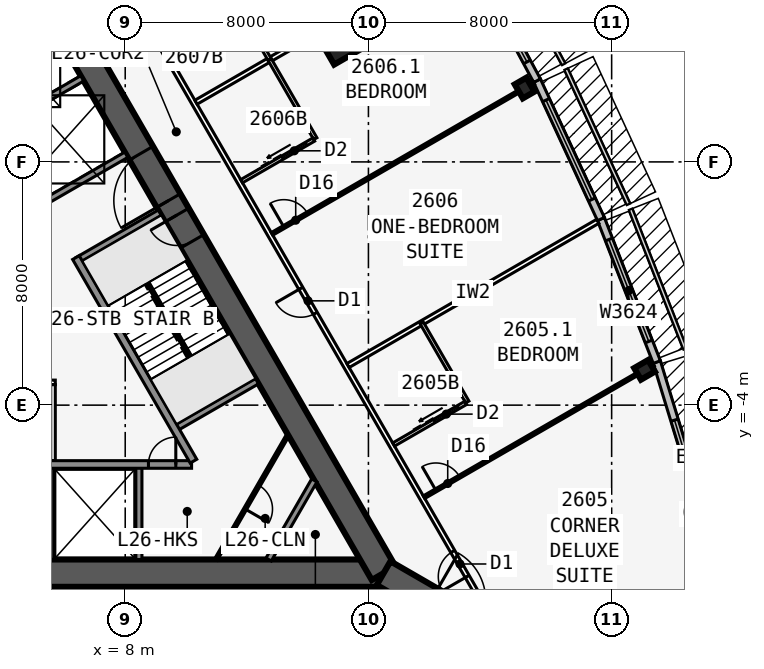
"""IFC4 building model, lengths in metres.
Left out: names, types, materials, properties, quantities, classifications, styles, units other than length and angle.
Written with IfcOpenShell. Run it as: python <this file> out.ifc"""

import sys

from ifc_helpers import new_model, si_unit, direction, frame, frame_2d, origin, origin_2d, place, context, subcontext, project, spatial, rectangle, i_section, extrude, element, fill, save


model = new_model("IFC4")
c1 = context("Model", 3, precision=1e-05, world=origin(), true_north=direction((0.0, 1.0)))
c2 = subcontext(c1, "Body", "Model", "MODEL_VIEW")
j1 = project(units=[si_unit("LENGTHUNIT", "METRE"), si_unit("PLANEANGLEUNIT", "RADIAN")], contexts=[c1])
p1 = place(None, origin())
s1 = spatial("IfcSite", under=j1, at=p1, CompositionType="ELEMENT")
p2 = place(p1, origin())
s2 = spatial("IfcBuilding", under=s1, at=p2, CompositionType="ELEMENT")
p3 = place(p2, frame((0.0, 0.0, 99.9)))
s3 = spatial("IfcBuildingStorey", under=s2, at=p3, CompositionType="ELEMENT", Elevation=99.9)
p4 = place(p3, frame((-16.5, -9.526, 0.0), z_axis=(0.0, 0.0, 1.0), x_axis=(1.0, 0.0, 0.0)))
e1 = element("IfcWall", 1, at=p4, inside=s3, PredefinedType="SHEAR", context=c2, shape_type="SweptSolid", body=[
    extrude(rectangle(XDim=33.0, YDim=0.9, at=frame_2d((16.5, 0.0))), origin(), (0.0, 0.0, 1.0), 3.4),
])
p5 = place(p4, frame((14.05, 0.0, 0.0)))
e2 = element("IfcOpeningElement", 2, at=p5, cuts=e1, PredefinedType="OPENING", context=c2, shape_type="SweptSolid", body=[
    extrude(rectangle(XDim=1.8, YDim=2.13, at=frame_2d((0.9, 1.065))), frame((0.0, 0.46, 0.0), z_axis=(0.0, -1.0, 0.0), x_axis=(1.0, 0.0, 0.0)), (0.0, 0.0, 1.0), 0.92),
])
p6 = place(p3, frame((-0.55, -5.951, 0.0), z_axis=(0.0, 0.0, 1.0), x_axis=(1.0, 0.0, 0.0)))
e3 = element("IfcWall", 3, at=p6, inside=s3, PredefinedType="SOLIDWALL", context=c2, shape_type="SweptSolid", body=[
    extrude(rectangle(XDim=10.733, YDim=0.25, at=frame_2d((5.366, 0.0))), origin(), (0.0, 0.0, 1.0), 3.15),
])
p7 = place(p6, frame((9.314, 0.0, 0.0)))
e4 = element("IfcOpeningElement", 4, at=p7, cuts=e3, PredefinedType="OPENING", context=c2, shape_type="SweptSolid", body=[
    extrude(rectangle(XDim=0.9, YDim=2.13, at=frame_2d((0.45, 1.065))), frame((0.0, 0.135, 0.0), z_axis=(0.0, -1.0, 0.0), x_axis=(1.0, 0.0, 0.0)), (0.0, 0.0, 1.0), 0.27),
])
p8 = place(p6, frame((1.05, 0.0, 0.0)))
e5 = element("IfcOpeningElement", 5, at=p8, cuts=e3, PredefinedType="OPENING", context=c2, shape_type="SweptSolid", body=[
    extrude(rectangle(XDim=1.1, YDim=2.13, at=frame_2d((0.55, 1.065))), frame((0.0, 0.135, 0.0), z_axis=(0.0, -1.0, 0.0), x_axis=(1.0, 0.0, 0.0)), (0.0, 0.0, 1.0), 0.27),
])
p9 = place(p6, frame((4.05, 0.0, 0.0)))
e6 = element("IfcOpeningElement", 6, at=p9, cuts=e3, PredefinedType="OPENING", context=c2, shape_type="SweptSolid", body=[
    extrude(rectangle(XDim=1.1, YDim=2.13, at=frame_2d((0.55, 1.065))), frame((0.0, 0.135, 0.0), z_axis=(0.0, -1.0, 0.0), x_axis=(1.0, 0.0, 0.0)), (0.0, 0.0, 1.0), 0.27),
])
for number, where, z_axis, x_axis in (
    (7, (5.55, -5.951, 0.0), (0.0, 0.0, 1.0), (0.0, -1.0, 0.0)),
    (8, (8.45, -5.951, 0.0), (0.0, 0.0, 1.0), (0.0, -1.0, 0.0)),
):
    element("IfcWall", number, at=place(p3, frame(where, z_axis=z_axis, x_axis=x_axis)), inside=s3, PredefinedType="SOLIDWALL", context=c2, shape_type="SweptSolid", body=[
        extrude(rectangle(XDim=3.125, YDim=0.2, at=frame_2d((1.562, 0.0))), origin(), (0.0, 0.0, 1.0), 3.15),
    ])
p10 = place(p3, frame((16.5, -9.526, 0.0), z_axis=(0.0, 0.0, 1.0), x_axis=(-0.499999749417, 0.866025548458, 0.0)))
e9 = element("IfcWall", 9, at=p10, inside=s3, PredefinedType="SHEAR", context=c2, shape_type="SweptSolid", body=[
    extrude(rectangle(XDim=33.0, YDim=0.9, at=frame_2d((16.5, 0.0))), origin(), (0.0, 0.0, 1.0), 3.4),
])
p11 = place(p10, frame((14.15, 0.0, 0.0)))
e10 = element("IfcOpeningElement", 10, at=p11, cuts=e9, PredefinedType="OPENING", context=c2, shape_type="SweptSolid", body=[
    extrude(rectangle(XDim=1.8, YDim=2.13, at=frame_2d((0.9, 1.065))), frame((0.0, 0.46, 0.0), z_axis=(0.0, -1.0, 0.0), x_axis=(1.0, 0.0, 0.0)), (0.0, 0.0, 1.0), 0.92),
])
p12 = place(p10, frame((12.6, 0.0, 0.0)))
e11 = element("IfcOpeningElement", 11, at=p12, cuts=e9, PredefinedType="OPENING", context=c2, shape_type="SweptSolid", body=[
    extrude(rectangle(XDim=1.0, YDim=2.13, at=frame_2d((0.5, 1.065))), frame((0.0, 0.46, 0.0), z_axis=(0.0, -1.0, 0.0), x_axis=(1.0, 0.0, 0.0)), (0.0, 0.0, 1.0), 0.92),
])
p13 = place(p3, frame((10.245, -5.843, 0.0), z_axis=(0.0, 0.0, 1.0), x_axis=(-0.499993009313, 0.866029439822, 0.0)))
e12 = element("IfcWall", 12, at=p13, inside=s3, PredefinedType="SOLIDWALL", context=c2, shape_type="SweptSolid", body=[
    extrude(rectangle(XDim=7.733, YDim=0.25, at=frame_2d((3.866, 0.0))), origin(), (0.0, 0.0, 1.0), 3.15),
])
for number, where, z_axis, x_axis in (
    (13, (9.629, -4.775, 0.0), (0.0, 0.0, 1.0), (0.866, 0.5, 0.0)),
    (14, (6.429, 0.767, 0.0), (0.0, 0.0, 1.0), (0.866, 0.5, 0.0)),
    (15, (5.329, 2.673, 0.0), (0.0, 0.0, 1.0), (0.866, 0.5, 0.0)),
    (16, (3.879, 5.184, 0.0), (0.0, 0.0, 1.0), (0.866, 0.5, 0.0)),
):
    element("IfcWall", number, at=place(p3, frame(where, z_axis=z_axis, x_axis=x_axis)), inside=s3, PredefinedType="SOLIDWALL", context=c2, shape_type="SweptSolid", body=[
        extrude(rectangle(XDim=3.125, YDim=0.2, at=frame_2d((1.562, 0.0))), origin(), (0.0, 0.0, 1.0), 3.15),
    ])
p14 = place(p3, frame((16.5, -9.526, 0.0), z_axis=(0.0, 0.0, 1.0), x_axis=(0.866031398331, -0.499989616998, 0.0)))
e17 = element("IfcWall", 17, at=p14, inside=s3, PredefinedType="SHEAR", context=c2, shape_type="SweptSolid", body=[
    extrude(rectangle(XDim=4.746, YDim=0.9, at=frame_2d((2.373, 0.0))), origin(), (0.0, 0.0, 1.0), 3.4),
])
p15 = place(p14, frame((1.8, 0.0, 0.0)))
e18 = element("IfcOpeningElement", 18, at=p15, cuts=e17, PredefinedType="OPENING", context=c2, shape_type="SweptSolid", body=[
    extrude(rectangle(XDim=1.8, YDim=2.13, at=frame_2d((0.9, 1.065))), frame((0.0, 0.46, 0.0), z_axis=(0.0, -1.0, 0.0), x_axis=(1.0, 0.0, 0.0)), (0.0, 0.0, 1.0), 0.92),
])
for number, where, z_axis, x_axis in (
    (19, (25.083, -2.839, 0.0), (0.0, 0.0, 1.0), (-0.5, 0.866, 0.0)),
    (20, (21.137, 6.43, 0.0), (0.0, 0.0, 1.0), (0.866, 0.5, 0.0)),
):
    element("IfcColumn", number, at=place(p3, frame(where, z_axis=z_axis, x_axis=x_axis)), inside=s3, PredefinedType="COLUMN", context=c2, shape_type="SweptSolid", body=[
        extrude(i_section(OverallWidth=0.442, OverallDepth=0.531, WebThickness=0.066, FlangeThickness=0.106, at=origin_2d()), origin(), (0.0, 0.0, 1.0), 3.4),
    ])
p16 = place(p3, frame((15.312, 8.84, 0.0), z_axis=(0.0, 0.0, 1.0), x_axis=(0.866025403784, 0.5, 0.0)))
e21 = element("IfcColumn", 21, at=p16, inside=s3, PredefinedType="COLUMN", context=c2, shape_type="SweptSolid", body=[
    extrude(rectangle(XDim=2.4, YDim=2.4, at=origin_2d()), origin(), (0.0, 0.0, 1.0), 3.4),
])
p17 = place(p3, frame((27.88, -10.429, 0.0), z_axis=(0.0, 0.0, 1.0), x_axis=(-0.2919790669, 0.956424709265, 0.0)))
e22 = element("IfcWall", 22, at=p17, inside=s3, PredefinedType="STANDARD", context=c2, shape_type="SweptSolid", body=[
    extrude(rectangle(XDim=8.211, YDim=0.25, at=frame_2d((4.105, 0.0))), origin(), (0.0, 0.0, 1.0), 3.15),
])
p18 = place(p17, frame((2.006, 0.0, 0.45)))
e23 = element("IfcOpeningElement", 23, at=p18, cuts=e22, PredefinedType="OPENING", context=c2, shape_type="SweptSolid", body=[
    extrude(rectangle(XDim=4.2, YDim=2.4, at=frame_2d((2.1, 1.2))), frame((0.0, 0.135, 0.0), z_axis=(0.0, -1.0, 0.0), x_axis=(1.0, 0.0, 0.0)), (0.0, 0.0, 1.0), 0.27),
])
p19 = place(p3, frame((25.486, -2.584, 0.0), z_axis=(0.0, 0.0, 1.0), x_axis=(-0.364013463868, 0.931393685894, 0.0)))
e24 = element("IfcWall", 24, at=p19, inside=s3, PredefinedType="STANDARD", context=c2, shape_type="SweptSolid", body=[
    extrude(rectangle(XDim=5.058, YDim=0.25, at=frame_2d((2.529, 0.0))), origin(), (0.0, 0.0, 1.0), 3.15),
])
p20 = place(p19, frame((0.729, 0.0, 0.45)))
e25 = element("IfcOpeningElement", 25, at=p20, cuts=e24, PredefinedType="OPENING", context=c2, shape_type="SweptSolid", body=[
    extrude(rectangle(XDim=3.6, YDim=2.4, at=frame_2d((1.8, 1.2))), frame((0.0, 0.135, 0.0), z_axis=(0.0, -1.0, 0.0), x_axis=(1.0, 0.0, 0.0)), (0.0, 0.0, 1.0), 0.27),
])
p21 = place(p3, frame((23.648, 2.119, 0.0), z_axis=(0.0, 0.0, 1.0), x_axis=(-0.419203100754, 0.907892482796, 0.0)))
e26 = element("IfcWall", 26, at=p21, inside=s3, PredefinedType="STANDARD", context=c2, shape_type="SweptSolid", body=[
    extrude(rectangle(XDim=5.021, YDim=0.25, at=frame_2d((2.51, 0.0))), origin(), (0.0, 0.0, 1.0), 3.15),
])
p22 = place(p21, frame((0.71, 0.0, 0.45)))
e27 = element("IfcOpeningElement", 27, at=p22, cuts=e26, PredefinedType="OPENING", context=c2, shape_type="SweptSolid", body=[
    extrude(rectangle(XDim=3.6, YDim=2.4, at=frame_2d((1.8, 1.2))), frame((0.0, 0.135, 0.0), z_axis=(0.0, -1.0, 0.0), x_axis=(1.0, 0.0, 0.0)), (0.0, 0.0, 1.0), 0.27),
])
p23 = place(p3, frame((21.547, 6.671, 0.0), z_axis=(0.0, 0.0, 1.0), x_axis=(-0.473412820489, 0.880840678782, 0.0)))
e28 = element("IfcWall", 28, at=p23, inside=s3, PredefinedType="STANDARD", context=c2, shape_type="SweptSolid", body=[
    extrude(rectangle(XDim=5.002, YDim=0.25, at=frame_2d((2.501, 0.0))), origin(), (0.0, 0.0, 1.0), 3.15),
])
p24 = place(p23, frame((0.701, 0.0, 0.45)))
e29 = element("IfcOpeningElement", 29, at=p24, cuts=e28, PredefinedType="OPENING", context=c2, shape_type="SweptSolid", body=[
    extrude(rectangle(XDim=3.6, YDim=2.4, at=frame_2d((1.8, 1.2))), frame((0.0, 0.135, 0.0), z_axis=(0.0, -1.0, 0.0), x_axis=(1.0, 0.0, 0.0)), (0.0, 0.0, 1.0), 0.27),
])
p25 = place(p3, frame((20.027, -10.985, 0.0), z_axis=(0.0, 0.0, 1.0), x_axis=(-0.500001677587, 0.866024435227, 0.0)))
e30 = element("IfcWall", 30, at=p25, inside=s3, PredefinedType="PARTITIONING", context=c2, shape_type="SweptSolid", body=[
    extrude(rectangle(XDim=39.054, YDim=0.15, at=frame_2d((19.527, 0.0))), origin(), (0.0, 0.0, 1.0), 3.15),
])
p26 = place(p25, frame((1.558, 0.0, 0.0)))
e31 = element("IfcOpeningElement", 31, at=p26, cuts=e30, PredefinedType="OPENING", context=c2, shape_type="SweptSolid", body=[
    extrude(rectangle(XDim=0.95, YDim=2.13, at=frame_2d((0.475, 1.065))), frame((0.0, 0.085, 0.0), z_axis=(0.0, -1.0, 0.0), x_axis=(1.0, 0.0, 0.0)), (0.0, 0.0, 1.0), 0.17),
])
p27 = place(p25, frame((11.552, 0.0, 0.0)))
e32 = element("IfcOpeningElement", 32, at=p27, cuts=e30, PredefinedType="OPENING", context=c2, shape_type="SweptSolid", body=[
    extrude(rectangle(XDim=0.95, YDim=2.13, at=frame_2d((0.475, 1.065))), frame((0.0, 0.085, 0.0), z_axis=(0.0, -1.0, 0.0), x_axis=(1.0, 0.0, 0.0)), (0.0, 0.0, 1.0), 0.17),
])
p28 = place(p25, frame((22.752, 0.0, 0.0)))
e33 = element("IfcOpeningElement", 33, at=p28, cuts=e30, PredefinedType="OPENING", context=c2, shape_type="SweptSolid", body=[
    extrude(rectangle(XDim=0.95, YDim=2.13, at=frame_2d((0.475, 1.065))), frame((0.0, 0.085, 0.0), z_axis=(0.0, -1.0, 0.0), x_axis=(1.0, 0.0, 0.0)), (0.0, 0.0, 1.0), 0.17),
])
p29 = place(p25, frame((36.546, 0.0, 0.0)))
e34 = element("IfcOpeningElement", 34, at=p29, cuts=e30, PredefinedType="OPENING", context=c2, shape_type="SweptSolid", body=[
    extrude(rectangle(XDim=0.95, YDim=2.13, at=frame_2d((0.475, 1.065))), frame((0.0, 0.085, 0.0), z_axis=(0.0, -1.0, 0.0), x_axis=(1.0, 0.0, 0.0)), (0.0, 0.0, 1.0), 0.17),
])
p30 = place(p3, frame((17.829, -7.027, 0.0), z_axis=(0.0, 0.0, 1.0), x_axis=(0.866032659912, 0.499987431809, 0.0)))
e35 = element("IfcWall", 35, at=p30, inside=s3, PredefinedType="PARTITIONING", context=c2, shape_type="SweptSolid", body=[
    extrude(rectangle(XDim=8.72, YDim=0.1, at=frame_2d((4.36, 0.0))), origin(), (0.0, 0.0, 1.0), 2.05),
])
p31 = place(p30, frame((0.45, 0.0, 0.0)))
e36 = element("IfcOpeningElement", 36, at=p31, cuts=e35, PredefinedType="OPENING", context=c2, shape_type="SweptSolid", body=[
    extrude(rectangle(XDim=0.9, YDim=2.032, at=frame_2d((0.45, 1.016))), frame((0.0, 0.06, 0.0), z_axis=(0.0, -1.0, 0.0), x_axis=(1.0, 0.0, 0.0)), (0.0, 0.0, 1.0), 0.12),
])
p32 = place(p3, frame((15.329, -2.697, 0.0), z_axis=(0.0, 0.0, 1.0), x_axis=(0.866018409083, 0.500012114982, 0.0)))
e37 = element("IfcWall", 37, at=p32, inside=s3, PredefinedType="PARTITIONING", context=c2, shape_type="SweptSolid", body=[
    extrude(rectangle(XDim=9.485, YDim=0.15, at=frame_2d((4.742, 0.0))), origin(), (0.0, 0.0, 1.0), 2.109),
])
p33 = place(p3, frame((12.829, 1.633, 0.0), z_axis=(0.0, 0.0, 1.0), x_axis=(0.866026934769, 0.499997348248, 0.0)))
e38 = element("IfcWall", 38, at=p33, inside=s3, PredefinedType="PARTITIONING", context=c2, shape_type="SweptSolid", body=[
    extrude(rectangle(XDim=9.943, YDim=0.1, at=frame_2d((4.971, 0.0))), origin(), (0.0, 0.0, 1.0), 2.05),
])
p34 = place(p33, frame((0.45, 0.0, 0.0)))
e39 = element("IfcOpeningElement", 39, at=p34, cuts=e38, PredefinedType="OPENING", context=c2, shape_type="SweptSolid", body=[
    extrude(rectangle(XDim=0.9, YDim=2.032, at=frame_2d((0.45, 1.016))), frame((0.0, 0.06, 0.0), z_axis=(0.0, -1.0, 0.0), x_axis=(1.0, 0.0, 0.0)), (0.0, 0.0, 1.0), 0.12),
])
p35 = place(p3, frame((10.329, 5.963, 0.0), z_axis=(0.0, 0.0, 1.0), x_axis=(0.866021688545, 0.500006434927, 0.0)))
e40 = element("IfcWall", 40, at=p35, inside=s3, PredefinedType="PARTITIONING", context=c2, shape_type="SweptSolid", body=[
    extrude(rectangle(XDim=10.096, YDim=0.15, at=frame_2d((5.048, 0.0))), origin(), (0.0, 0.0, 1.0), 2.109),
])
p36 = place(p3, frame((19.253, -3.895, 0.0), z_axis=(0.0, 0.0, 1.0), x_axis=(-0.499990139034, 0.866031096941, 0.0)))
e41 = element("IfcWall", 41, at=p36, inside=s3, PredefinedType="PLUMBINGWALL", context=c2, shape_type="SweptSolid", body=[
    extrude(rectangle(XDim=3.0, YDim=0.12, at=frame_2d((1.5, 0.0))), origin(), (0.0, 0.0, 1.0), 3.15),
])
p37 = place(p3, frame((16.829, -5.295, 0.0), z_axis=(0.0, 0.0, 1.0), x_axis=(0.866035715982, 0.499982138324, 0.0)))
e42 = element("IfcWall", 42, at=p37, inside=s3, PredefinedType="PLUMBINGWALL", context=c2, shape_type="SweptSolid", body=[
    extrude(rectangle(XDim=2.74, YDim=0.12, at=frame_2d((1.37, 0.0))), origin(), (0.0, 0.0, 1.0), 3.15),
])
p38 = place(p37, frame((1.55, 0.0, 0.0)))
e43 = element("IfcOpeningElement", 43, at=p38, cuts=e42, PredefinedType="OPENING", context=c2, shape_type="SweptSolid", body=[
    extrude(rectangle(XDim=0.9, YDim=2.13, at=frame_2d((0.45, 1.065))), frame((0.0, 0.07, 0.0), z_axis=(0.0, -1.0, 0.0), x_axis=(1.0, 0.0, 0.0)), (0.0, 0.0, 1.0), 0.14),
])
p39 = place(p3, frame((14.253, 4.765, 0.0), z_axis=(0.0, 0.0, 1.0), x_axis=(-0.50002537861, 0.866010750942, 0.0)))
e44 = element("IfcWall", 44, at=p39, inside=s3, PredefinedType="PLUMBINGWALL", context=c2, shape_type="SweptSolid", body=[
    extrude(rectangle(XDim=3.0, YDim=0.12, at=frame_2d((1.5, 0.0))), origin(), (0.0, 0.0, 1.0), 3.15),
])
p40 = place(p3, frame((11.829, 3.365, 0.0), z_axis=(0.0, 0.0, 1.0), x_axis=(0.865997131366, 0.500048966069, 0.0)))
e45 = element("IfcWall", 45, at=p40, inside=s3, PredefinedType="PLUMBINGWALL", context=c2, shape_type="SweptSolid", body=[
    extrude(rectangle(XDim=2.74, YDim=0.12, at=frame_2d((1.37, 0.0))), origin(), (0.0, 0.0, 1.0), 3.15),
])
p41 = place(p40, frame((1.55, 0.0, 0.0)))
e46 = element("IfcOpeningElement", 46, at=p41, cuts=e45, PredefinedType="OPENING", context=c2, shape_type="SweptSolid", body=[
    extrude(rectangle(XDim=0.9, YDim=2.13, at=frame_2d((0.45, 1.065))), frame((0.0, 0.07, 0.0), z_axis=(0.0, -1.0, 0.0), x_axis=(1.0, 0.0, 0.0)), (0.0, 0.0, 1.0), 0.14),
])
p42 = place(p3, frame((12.753, 7.363, 0.0), z_axis=(0.0, 0.0, 1.0), x_axis=(-0.499990139034, 0.866031096941, 0.0)))
e47 = element("IfcWall", 47, at=p42, inside=s3, PredefinedType="PLUMBINGWALL", context=c2, shape_type="SweptSolid", body=[
    extrude(rectangle(XDim=3.0, YDim=0.12, at=frame_2d((1.5, 0.0))), origin(), (0.0, 0.0, 1.0), 3.15),
])
p43 = place(p3, frame((-2.65, -3.251, 0.0), z_axis=(0.0, 0.0, 1.0), x_axis=(1.0, 0.0, 0.0)))
e48 = element("IfcWall", 48, at=p43, inside=s3, PredefinedType="PARTITIONING", context=c2, shape_type="SweptSolid", body=[
    extrude(rectangle(XDim=8.35, YDim=0.15, at=frame_2d((4.175, 0.0))), origin(), (0.0, 0.0, 1.0), 3.15),
])
p44 = place(p3, frame((5.625, -5.826, 0.0), z_axis=(0.0, 0.0, 1.0), x_axis=(0.0, 1.0, 0.0)))
e49 = element("IfcWall", 49, at=p44, inside=s3, PredefinedType="PARTITIONING", context=c2, shape_type="SweptSolid", body=[
    extrude(rectangle(XDim=2.5, YDim=0.15, at=frame_2d((1.25, 0.0))), origin(), (0.0, 0.0, 1.0), 3.15),
])
p45 = place(p3, frame((14.219, -6.476, 0.0), z_axis=(0.0, 0.0, 1.0), x_axis=(-0.499952404951, -0.866052881055, 0.0)))
e50 = element("IfcWall", 50, at=p45, inside=s3, PredefinedType="SOLIDWALL", context=c2, shape_type="SweptSolid", body=[
    extrude(rectangle(XDim=3.002, YDim=0.2, at=frame_2d((1.501, 0.0))), origin(), (0.0, 0.0, 1.0), 3.15),
])
p46 = place(p3, frame((13.354, -4.976, 0.0), z_axis=(0.0, 0.0, 1.0), x_axis=(-0.499999210213, -0.866025859768, 0.0)))
e51 = element("IfcWall", 51, at=p46, inside=s3, PredefinedType="PARTITIONING", context=c2, shape_type="SweptSolid", body=[
    extrude(rectangle(XDim=4.734, YDim=0.1, at=frame_2d((2.367, 0.0))), origin(), (0.0, 0.0, 1.0), 3.15),
])
p47 = place(p46, frame((1.917, 0.0, 0.0)))
e52 = element("IfcOpeningElement", 52, at=p47, cuts=e51, PredefinedType="OPENING", context=c2, shape_type="SweptSolid", body=[
    extrude(rectangle(XDim=0.9, YDim=2.13, at=frame_2d((0.45, 1.065))), frame((0.0, 0.06, 0.0), z_axis=(0.0, -1.0, 0.0), x_axis=(1.0, 0.0, 0.0)), (0.0, 0.0, 1.0), 0.12),
])
p48 = place(p3, frame((10.135, -2.401, 0.0), z_axis=(0.0, 0.0, 1.0), x_axis=(-0.499992232847, 0.866029888106, 0.0)))
e53 = element("IfcWall", 53, at=p48, inside=s3, PredefinedType="SOLIDWALL", context=c2, shape_type="SweptSolid", body=[
    extrude(rectangle(XDim=2.794, YDim=0.1, at=frame_2d((1.397, 0.0))), origin(), (0.0, 0.0, 1.0), 3.4),
])
p49 = place(p18, origin())
e54 = element("IfcWindow", 54, at=p49, inside=s3, PartitioningType="SINGLE_PANEL", PredefinedType="WINDOW", context=c2, shape_type="SweptSolid", body=[
    extrude(rectangle(XDim=4.2, YDim=2.4, at=frame_2d((2.1, 1.2))), frame((0.0, 0.03, 0.0), z_axis=(0.0, -1.0, 0.0), x_axis=(1.0, 0.0, 0.0)), (0.0, 0.0, 1.0), 0.06),
])
fill(e23, e54)
p50 = place(p20, origin())
e55 = element("IfcWindow", 55, at=p50, inside=s3, PartitioningType="SINGLE_PANEL", PredefinedType="WINDOW", context=c2, shape_type="SweptSolid", body=[
    extrude(rectangle(XDim=3.6, YDim=2.4, at=frame_2d((1.8, 1.2))), frame((0.0, 0.03, 0.0), z_axis=(0.0, -1.0, 0.0), x_axis=(1.0, 0.0, 0.0)), (0.0, 0.0, 1.0), 0.06),
])
fill(e25, e55)
p51 = place(p22, origin())
e56 = element("IfcWindow", 56, at=p51, inside=s3, PartitioningType="SINGLE_PANEL", PredefinedType="WINDOW", context=c2, shape_type="SweptSolid", body=[
    extrude(rectangle(XDim=3.6, YDim=2.4, at=frame_2d((1.8, 1.2))), frame((0.0, 0.03, 0.0), z_axis=(0.0, -1.0, 0.0), x_axis=(1.0, 0.0, 0.0)), (0.0, 0.0, 1.0), 0.06),
])
fill(e27, e56)
p52 = place(p24, origin())
e57 = element("IfcWindow", 57, at=p52, inside=s3, PartitioningType="SINGLE_PANEL", PredefinedType="WINDOW", context=c2, shape_type="SweptSolid", body=[
    extrude(rectangle(XDim=3.6, YDim=2.4, at=frame_2d((1.8, 1.2))), frame((0.0, 0.03, 0.0), z_axis=(0.0, -1.0, 0.0), x_axis=(1.0, 0.0, 0.0)), (0.0, 0.0, 1.0), 0.06),
])
fill(e29, e57)
p53 = place(p31, origin())
e58 = element("IfcDoor", 58, at=p53, inside=s3, OperationType="SINGLE_SWING_LEFT", PredefinedType="DOOR", context=c2, shape_type="SweptSolid", body=[
    extrude(rectangle(XDim=0.9, YDim=2.032, at=frame_2d((0.45, 1.016))), frame((0.0, 0.025, 0.0), z_axis=(0.0, -1.0, 0.0), x_axis=(1.0, 0.0, 0.0)), (0.0, 0.0, 1.0), 0.05),
])
fill(e36, e58)
p54 = place(p34, origin())
e59 = element("IfcDoor", 59, at=p54, inside=s3, OperationType="SINGLE_SWING_LEFT", PredefinedType="DOOR", context=c2, shape_type="SweptSolid", body=[
    extrude(rectangle(XDim=0.9, YDim=2.032, at=frame_2d((0.45, 1.016))), frame((0.0, 0.025, 0.0), z_axis=(0.0, -1.0, 0.0), x_axis=(1.0, 0.0, 0.0)), (0.0, 0.0, 1.0), 0.05),
])
fill(e39, e59)
p55 = place(p26, origin())
e60 = element("IfcDoor", 60, at=p55, inside=s3, OperationType="SINGLE_SWING_LEFT", PredefinedType="DOOR", context=c2, shape_type="SweptSolid", body=[
    extrude(rectangle(XDim=0.95, YDim=2.13, at=frame_2d((0.475, 1.065))), frame((0.0, 0.025, 0.0), z_axis=(0.0, -1.0, 0.0), x_axis=(1.0, 0.0, 0.0)), (0.0, 0.0, 1.0), 0.05),
])
fill(e31, e60)
p56 = place(p38, origin())
e61 = element("IfcDoor", 61, at=p56, inside=s3, OperationType="SLIDING_TO_LEFT", PredefinedType="DOOR", context=c2, shape_type="SweptSolid", body=[
    extrude(rectangle(XDim=0.9, YDim=2.13, at=frame_2d((0.45, 1.065))), frame((0.0, 0.025, 0.0), z_axis=(0.0, -1.0, 0.0), x_axis=(1.0, 0.0, 0.0)), (0.0, 0.0, 1.0), 0.05),
])
fill(e43, e61)
p57 = place(p27, origin())
e62 = element("IfcDoor", 62, at=p57, inside=s3, OperationType="SINGLE_SWING_RIGHT", PredefinedType="DOOR", context=c2, shape_type="SweptSolid", body=[
    extrude(rectangle(XDim=0.95, YDim=2.13, at=frame_2d((0.475, 1.065))), frame((0.0, 0.025, 0.0), z_axis=(0.0, -1.0, 0.0), x_axis=(1.0, 0.0, 0.0)), (0.0, 0.0, 1.0), 0.05),
])
fill(e32, e62)
p58 = place(p41, origin())
e63 = element("IfcDoor", 63, at=p58, inside=s3, OperationType="SLIDING_TO_LEFT", PredefinedType="DOOR", context=c2, shape_type="SweptSolid", body=[
    extrude(rectangle(XDim=0.9, YDim=2.13, at=frame_2d((0.45, 1.065))), frame((0.0, 0.025, 0.0), z_axis=(0.0, -1.0, 0.0), x_axis=(1.0, 0.0, 0.0)), (0.0, 0.0, 1.0), 0.05),
])
fill(e46, e63)
p59 = place(p11, origin())
e64 = element("IfcDoor", 64, at=p59, inside=s3, OperationType="DOUBLE_DOOR_SINGLE_SWING", PredefinedType="DOOR", context=c2, shape_type="SweptSolid", body=[
    extrude(rectangle(XDim=1.8, YDim=2.13, at=frame_2d((0.9, 1.065))), frame((0.0, 0.025, 0.0), z_axis=(0.0, -1.0, 0.0), x_axis=(1.0, 0.0, 0.0)), (0.0, 0.0, 1.0), 0.05),
])
fill(e10, e64)
p60 = place(p12, origin())
e65 = element("IfcDoor", 65, at=p60, inside=s3, OperationType="SINGLE_SWING_RIGHT", PredefinedType="DOOR", context=c2, shape_type="SweptSolid", body=[
    extrude(rectangle(XDim=1.0, YDim=2.13, at=frame_2d((0.5, 1.065))), frame((0.0, 0.025, 0.0), z_axis=(0.0, -1.0, 0.0), x_axis=(1.0, 0.0, 0.0)), (0.0, 0.0, 1.0), 0.05),
])
fill(e11, e65)
p61 = place(p47, origin())
e66 = element("IfcDoor", 66, at=p61, inside=s3, OperationType="SINGLE_SWING_RIGHT", PredefinedType="DOOR", context=c2, shape_type="SweptSolid", body=[
    extrude(rectangle(XDim=0.9, YDim=2.13, at=frame_2d((0.45, 1.065))), frame((0.0, 0.025, 0.0), z_axis=(0.0, -1.0, 0.0), x_axis=(1.0, 0.0, 0.0)), (0.0, 0.0, 1.0), 0.05),
])
fill(e52, e66)
p62 = place(p7, origin())
e67 = element("IfcDoor", 67, at=p62, inside=s3, OperationType="SINGLE_SWING_RIGHT", PredefinedType="DOOR", context=c2, shape_type="SweptSolid", body=[
    extrude(rectangle(XDim=0.9, YDim=2.13, at=frame_2d((0.45, 1.065))), frame((0.0, 0.025, 0.0), z_axis=(0.0, -1.0, 0.0), x_axis=(1.0, 0.0, 0.0)), (0.0, 0.0, 1.0), 0.05),
])
fill(e4, e67)
save(model, sys.argv[1])
